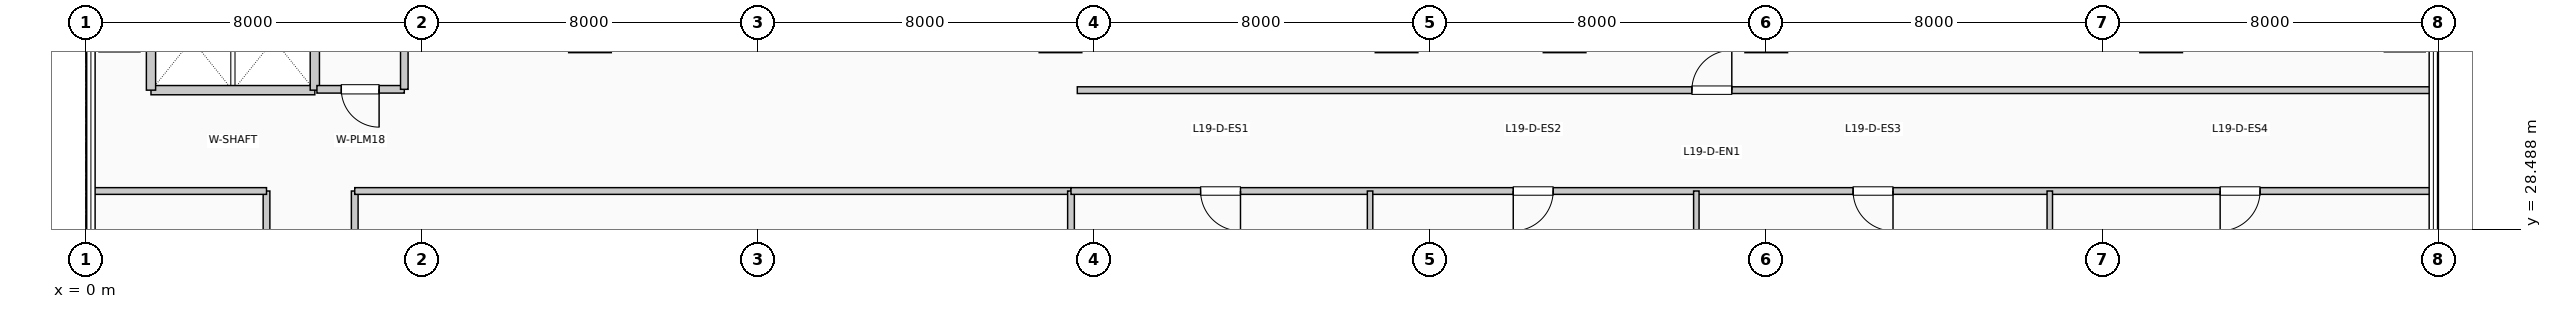
"""IFC4 building model, lengths in metres.
Left out: names, types, materials, properties, quantities, classifications, styles, units other than length and angle.
Written with IfcOpenShell. Run it as: python <this file> out.ifc"""

import sys

from ifc_helpers import new_model, si_unit, direction, frame, frame_2d, origin, place, context, subcontext, project, spatial, rectangle, extrude, element, fill, save


model = new_model("IFC4")
c1 = context("Model", 3, precision=1e-05, world=origin(), true_north=direction((0.0, 1.0)))
c2 = subcontext(c1, "Body", "Model", "MODEL_VIEW")
j1 = project(units=[si_unit("LENGTHUNIT", "METRE"), si_unit("PLANEANGLEUNIT", "RADIAN")], contexts=[c1])
p1 = place(None, origin())
s1 = spatial("IfcSite", under=j1, at=p1, CompositionType="ELEMENT")
p2 = place(p1, origin())
s2 = spatial("IfcBuilding", under=s1, at=p2, CompositionType="ELEMENT")
p3 = place(p2, frame((0.0, 0.0, 81.84)))
s3 = spatial("IfcBuildingStorey", under=s2, at=p3, CompositionType="ELEMENT", Elevation=81.84)
p4 = place(p3, frame((1.55, 31.8, 0.0), z_axis=(0.0, 0.0, 1.0), x_axis=(1.0, 0.0, 0.0)))
e1 = element("IfcWall", 1, at=p4, inside=s3, PredefinedType="PARTITIONING", context=c2, shape_type="SweptSolid", body=[
    extrude(rectangle(XDim=3.9, YDim=0.22, at=frame_2d((1.95, 0.0))), origin(), (0.0, 0.0, 1.0), 3.71),
])
for number, where, z_axis, x_axis in (
    (2, (1.55, 31.8, 0.0), (0.0, 0.0, 1.0), (0.0, 1.0, 0.0)),
    (3, (5.45, 31.8, 0.0), (0.0, 0.0, 1.0), (0.0, 1.0, 0.0)),
):
    element("IfcWall", number, at=place(p3, frame(where, z_axis=z_axis, x_axis=x_axis)), inside=s3, PredefinedType="PARTITIONING", context=c2, shape_type="SweptSolid", body=[
        extrude(rectangle(XDim=2.38, YDim=0.22, at=frame_2d((1.19, 0.0))), origin(), (0.0, 0.0, 1.0), 3.71),
    ])
p5 = place(p3, frame((5.5, 31.82, 0.0), z_axis=(0.0, 0.0, 1.0), x_axis=(1.0, 0.0, 0.0)))
e4 = element("IfcWall", 4, at=p5, inside=s3, PredefinedType="PLUMBINGWALL", context=c2, shape_type="SweptSolid", body=[
    extrude(rectangle(XDim=2.08, YDim=0.18, at=frame_2d((1.04, 0.0))), origin(), (0.0, 0.0, 1.0), 3.71),
])
p6 = place(p5, frame((1.48, 0.0, 0.0), z_axis=(0.0, 0.0, 1.0), x_axis=(-1.0, 0.0, 0.0)))
e5 = element("IfcOpeningElement", 5, at=p6, cuts=e4, PredefinedType="OPENING", context=c2, shape_type="SweptSolid", body=[
    extrude(rectangle(XDim=0.9, YDim=2.1, at=frame_2d((0.45, 1.05))), frame((0.0, 0.1, 0.0), z_axis=(0.0, -1.0, 0.0), x_axis=(1.0, 0.0, 0.0)), (0.0, 0.0, 1.0), 0.2),
])
p7 = place(p3, frame((7.58, 31.82, 0.0), z_axis=(0.0, 0.0, 1.0), x_axis=(0.0, 1.0, 0.0)))
e6 = element("IfcWall", 6, at=p7, inside=s3, PredefinedType="PLUMBINGWALL", context=c2, shape_type="SweptSolid", body=[
    extrude(rectangle(XDim=2.36, YDim=0.18, at=frame_2d((1.18, 0.0))), origin(), (0.0, 0.0, 1.0), 3.71),
])
p8 = place(p3, frame((4.3, 9.8, 0.0), z_axis=(0.0, 0.0, 1.0), x_axis=(0.0, 1.0, 0.0)))
e7 = element("IfcWall", 7, at=p8, inside=s3, PredefinedType="PARTITIONING", context=c2, shape_type="SweptSolid", body=[
    extrude(rectangle(XDim=19.6, YDim=0.16, at=frame_2d((9.8, 0.0))), origin(), (0.0, 0.0, 1.0), 3.71),
])
p9 = place(p8, frame((10.275, 0.0, 0.0), z_axis=(0.0, 0.0, 1.0), x_axis=(-1.0, 0.0, 0.0)))
e8 = element("IfcOpeningElement", 8, at=p9, cuts=e7, PredefinedType="OPENING", context=c2, shape_type="SweptSolid", body=[
    extrude(rectangle(XDim=0.95, YDim=2.15, at=frame_2d((0.475, 1.075))), frame((0.0, 0.09, 0.0), z_axis=(0.0, -1.0, 0.0), x_axis=(1.0, 0.0, 0.0)), (0.0, 0.0, 1.0), 0.18),
])
p10 = place(p3, frame((6.4, 9.8, 0.0), z_axis=(0.0, 0.0, 1.0), x_axis=(0.0, 1.0, 0.0)))
e9 = element("IfcWall", 9, at=p10, inside=s3, PredefinedType="PARTITIONING", context=c2, shape_type="SweptSolid", body=[
    extrude(rectangle(XDim=19.6, YDim=0.16, at=frame_2d((9.8, 0.0))), origin(), (0.0, 0.0, 1.0), 3.71),
])
p11 = place(p10, frame((1.387, 0.0, 0.0)))
e10 = element("IfcOpeningElement", 10, at=p11, cuts=e9, PredefinedType="OPENING", context=c2, shape_type="SweptSolid", body=[
    extrude(rectangle(XDim=0.95, YDim=2.15, at=frame_2d((0.475, 1.075))), frame((0.0, 0.09, 0.0), z_axis=(0.0, -1.0, 0.0), x_axis=(1.0, 0.0, 0.0)), (0.0, 0.0, 1.0), 0.18),
])
p12 = place(p10, frame((5.111, 0.0, 0.0)))
e11 = element("IfcOpeningElement", 11, at=p12, cuts=e9, PredefinedType="OPENING", context=c2, shape_type="SweptSolid", body=[
    extrude(rectangle(XDim=0.95, YDim=2.15, at=frame_2d((0.475, 1.075))), frame((0.0, 0.09, 0.0), z_axis=(0.0, -1.0, 0.0), x_axis=(1.0, 0.0, 0.0)), (0.0, 0.0, 1.0), 0.18),
])
p13 = place(p10, frame((8.933, 0.0, 0.0)))
e12 = element("IfcOpeningElement", 12, at=p13, cuts=e9, PredefinedType="OPENING", context=c2, shape_type="SweptSolid", body=[
    extrude(rectangle(XDim=0.95, YDim=2.15, at=frame_2d((0.475, 1.075))), frame((0.0, 0.09, 0.0), z_axis=(0.0, -1.0, 0.0), x_axis=(1.0, 0.0, 0.0)), (0.0, 0.0, 1.0), 0.18),
])
p14 = place(p10, frame((12.951, 0.0, 0.0)))
e13 = element("IfcOpeningElement", 13, at=p14, cuts=e9, PredefinedType="OPENING", context=c2, shape_type="SweptSolid", body=[
    extrude(rectangle(XDim=0.95, YDim=2.15, at=frame_2d((0.475, 1.075))), frame((0.0, 0.09, 0.0), z_axis=(0.0, -1.0, 0.0), x_axis=(1.0, 0.0, 0.0)), (0.0, 0.0, 1.0), 0.18),
])
p15 = place(p10, frame((17.067, 0.0, 0.0)))
e14 = element("IfcOpeningElement", 14, at=p15, cuts=e9, PredefinedType="OPENING", context=c2, shape_type="SweptSolid", body=[
    extrude(rectangle(XDim=0.95, YDim=2.15, at=frame_2d((0.475, 1.075))), frame((0.0, 0.09, 0.0), z_axis=(0.0, -1.0, 0.0), x_axis=(1.0, 0.0, 0.0)), (0.0, 0.0, 1.0), 0.18),
])
p16 = place(p3, frame((0.19, 29.4, 0.0), z_axis=(0.0, 0.0, 1.0), x_axis=(1.0, 0.0, 0.0)))
e15 = element("IfcWall", 15, at=p16, inside=s3, PredefinedType="PARTITIONING", context=c2, shape_type="SweptSolid", body=[
    extrude(rectangle(XDim=4.11, YDim=0.16, at=frame_2d((2.055, 0.0))), origin(), (0.0, 0.0, 1.0), 3.365),
])
p17 = place(p3, frame((6.4, 29.4, 0.0), z_axis=(0.0, 0.0, 1.0), x_axis=(1.0, 0.0, 0.0)))
e16 = element("IfcWall", 16, at=p17, inside=s3, PredefinedType="PARTITIONING", context=c2, shape_type="SweptSolid", body=[
    extrude(rectangle(XDim=17.05, YDim=0.16, at=frame_2d((8.525, 0.0))), origin(), (0.0, 0.0, 1.0), 3.365),
])
p18 = place(p3, frame((23.45, 0.19, 0.0), z_axis=(0.0, 0.0, 1.0), x_axis=(0.0, 1.0, 0.0)))
e17 = element("IfcWall", 17, at=p18, inside=s3, PredefinedType="PARTITIONING", context=c2, shape_type="SweptSolid", body=[
    extrude(rectangle(XDim=29.21, YDim=0.16, at=frame_2d((14.605, 0.0))), origin(), (0.0, 0.0, 1.0), 2.995),
])
p19 = place(p3, frame((23.45, 29.4, 0.0), z_axis=(0.0, 0.0, 1.0), x_axis=(1.0, 0.0, 0.0)))
e18 = element("IfcWall", 18, at=p19, inside=s3, PredefinedType="PARTITIONING", context=c2, shape_type="SweptSolid", body=[
    extrude(rectangle(XDim=32.36, YDim=0.16, at=frame_2d((16.18, 0.0))), origin(), (0.0, 0.0, 1.0), 3.365),
])
p20 = place(p19, frame((4.035, 0.0, 0.0), z_axis=(0.0, 0.0, 1.0), x_axis=(-1.0, 0.0, 0.0)))
e19 = element("IfcOpeningElement", 19, at=p20, cuts=e18, PredefinedType="OPENING", context=c2, shape_type="SweptSolid", body=[
    extrude(rectangle(XDim=0.95, YDim=2.15, at=frame_2d((0.475, 1.075))), frame((0.0, 0.09, 0.0), z_axis=(0.0, -1.0, 0.0), x_axis=(1.0, 0.0, 0.0)), (0.0, 0.0, 1.0), 0.18),
])
p21 = place(p19, frame((11.477, 0.0, 0.0), z_axis=(0.0, 0.0, 1.0), x_axis=(-1.0, 0.0, 0.0)))
e20 = element("IfcOpeningElement", 20, at=p21, cuts=e18, PredefinedType="OPENING", context=c2, shape_type="SweptSolid", body=[
    extrude(rectangle(XDim=0.95, YDim=2.15, at=frame_2d((0.475, 1.075))), frame((0.0, 0.09, 0.0), z_axis=(0.0, -1.0, 0.0), x_axis=(1.0, 0.0, 0.0)), (0.0, 0.0, 1.0), 0.18),
])
p22 = place(p19, frame((19.567, 0.0, 0.0), z_axis=(0.0, 0.0, 1.0), x_axis=(-1.0, 0.0, 0.0)))
e21 = element("IfcOpeningElement", 21, at=p22, cuts=e18, PredefinedType="OPENING", context=c2, shape_type="SweptSolid", body=[
    extrude(rectangle(XDim=0.95, YDim=2.15, at=frame_2d((0.475, 1.075))), frame((0.0, 0.09, 0.0), z_axis=(0.0, -1.0, 0.0), x_axis=(1.0, 0.0, 0.0)), (0.0, 0.0, 1.0), 0.18),
])
p23 = place(p19, frame((28.304, 0.0, 0.0), z_axis=(0.0, 0.0, 1.0), x_axis=(-1.0, 0.0, 0.0)))
e22 = element("IfcOpeningElement", 22, at=p23, cuts=e18, PredefinedType="OPENING", context=c2, shape_type="SweptSolid", body=[
    extrude(rectangle(XDim=0.95, YDim=2.15, at=frame_2d((0.475, 1.075))), frame((0.0, 0.09, 0.0), z_axis=(0.0, -1.0, 0.0), x_axis=(1.0, 0.0, 0.0)), (0.0, 0.0, 1.0), 0.18),
])
p24 = place(p3, frame((23.6, 31.8, 0.0), z_axis=(0.0, 0.0, 1.0), x_axis=(1.0, 0.0, 0.0)))
e23 = element("IfcWall", 23, at=p24, inside=s3, PredefinedType="PARTITIONING", context=c2, shape_type="SweptSolid", body=[
    extrude(rectangle(XDim=32.21, YDim=0.16, at=frame_2d((16.105, 0.0))), origin(), (0.0, 0.0, 1.0), 3.71),
])
p25 = place(p24, frame((14.63, 0.0, 0.0)))
e24 = element("IfcOpeningElement", 24, at=p25, cuts=e23, PredefinedType="OPENING", context=c2, shape_type="SweptSolid", body=[
    extrude(rectangle(XDim=0.95, YDim=2.15, at=frame_2d((0.475, 1.075))), frame((0.0, 0.09, 0.0), z_axis=(0.0, -1.0, 0.0), x_axis=(1.0, 0.0, 0.0)), (0.0, 0.0, 1.0), 0.18),
])
for number, where, z_axis, x_axis in (
    (25, (30.569, 18.19, 0.0), (0.0, 0.0, 1.0), (0.0, 1.0, 0.0)),
    (26, (38.336, 18.19, 0.0), (0.0, 0.0, 1.0), (0.0, 1.0, 0.0)),
    (27, (46.749, 18.19, 0.0), (0.0, 0.0, 1.0), (0.0, 1.0, 0.0)),
):
    element("IfcWall", number, at=place(p3, frame(where, z_axis=z_axis, x_axis=x_axis)), inside=s3, PredefinedType="PARTITIONING", context=c2, shape_type="SweptSolid", body=[
        extrude(rectangle(XDim=11.21, YDim=0.13, at=frame_2d((5.605, 0.0))), origin(), (0.0, 0.0, 1.0), 3.71),
    ])
p26 = place(p6, origin())
e28 = element("IfcDoor", 28, at=p26, inside=s3, OperationType="SINGLE_SWING_RIGHT", PredefinedType="DOOR", context=c2, shape_type="SweptSolid", body=[
    extrude(rectangle(XDim=0.9, YDim=2.1, at=frame_2d((0.45, 1.05))), frame((0.0, 0.025, 0.0), z_axis=(0.0, -1.0, 0.0), x_axis=(1.0, 0.0, 0.0)), (0.0, 0.0, 1.0), 0.05),
])
fill(e5, e28)
p27 = place(p20, origin())
e29 = element("IfcDoor", 29, at=p27, inside=s3, OperationType="SINGLE_SWING_RIGHT", PredefinedType="DOOR", context=c2, shape_type="SweptSolid", body=[
    extrude(rectangle(XDim=0.95, YDim=2.15, at=frame_2d((0.475, 1.075))), frame((0.0, 0.025, 0.0), z_axis=(0.0, -1.0, 0.0), x_axis=(1.0, 0.0, 0.0)), (0.0, 0.0, 1.0), 0.05),
])
fill(e19, e29)
p28 = place(p21, origin())
e30 = element("IfcDoor", 30, at=p28, inside=s3, OperationType="SINGLE_SWING_LEFT", PredefinedType="DOOR", context=c2, shape_type="SweptSolid", body=[
    extrude(rectangle(XDim=0.95, YDim=2.15, at=frame_2d((0.475, 1.075))), frame((0.0, 0.025, 0.0), z_axis=(0.0, -1.0, 0.0), x_axis=(1.0, 0.0, 0.0)), (0.0, 0.0, 1.0), 0.05),
])
fill(e20, e30)
p29 = place(p22, origin())
e31 = element("IfcDoor", 31, at=p29, inside=s3, OperationType="SINGLE_SWING_RIGHT", PredefinedType="DOOR", context=c2, shape_type="SweptSolid", body=[
    extrude(rectangle(XDim=0.95, YDim=2.15, at=frame_2d((0.475, 1.075))), frame((0.0, 0.025, 0.0), z_axis=(0.0, -1.0, 0.0), x_axis=(1.0, 0.0, 0.0)), (0.0, 0.0, 1.0), 0.05),
])
fill(e21, e31)
p30 = place(p23, origin())
e32 = element("IfcDoor", 32, at=p30, inside=s3, OperationType="SINGLE_SWING_LEFT", PredefinedType="DOOR", context=c2, shape_type="SweptSolid", body=[
    extrude(rectangle(XDim=0.95, YDim=2.15, at=frame_2d((0.475, 1.075))), frame((0.0, 0.025, 0.0), z_axis=(0.0, -1.0, 0.0), x_axis=(1.0, 0.0, 0.0)), (0.0, 0.0, 1.0), 0.05),
])
fill(e22, e32)
p31 = place(p25, origin())
e33 = element("IfcDoor", 33, at=p31, inside=s3, OperationType="SINGLE_SWING_RIGHT", PredefinedType="DOOR", context=c2, shape_type="SweptSolid", body=[
    extrude(rectangle(XDim=0.95, YDim=2.15, at=frame_2d((0.475, 1.075))), frame((0.0, 0.025, 0.0), z_axis=(0.0, -1.0, 0.0), x_axis=(1.0, 0.0, 0.0)), (0.0, 0.0, 1.0), 0.05),
])
fill(e24, e33)
save(model, sys.argv[1])
